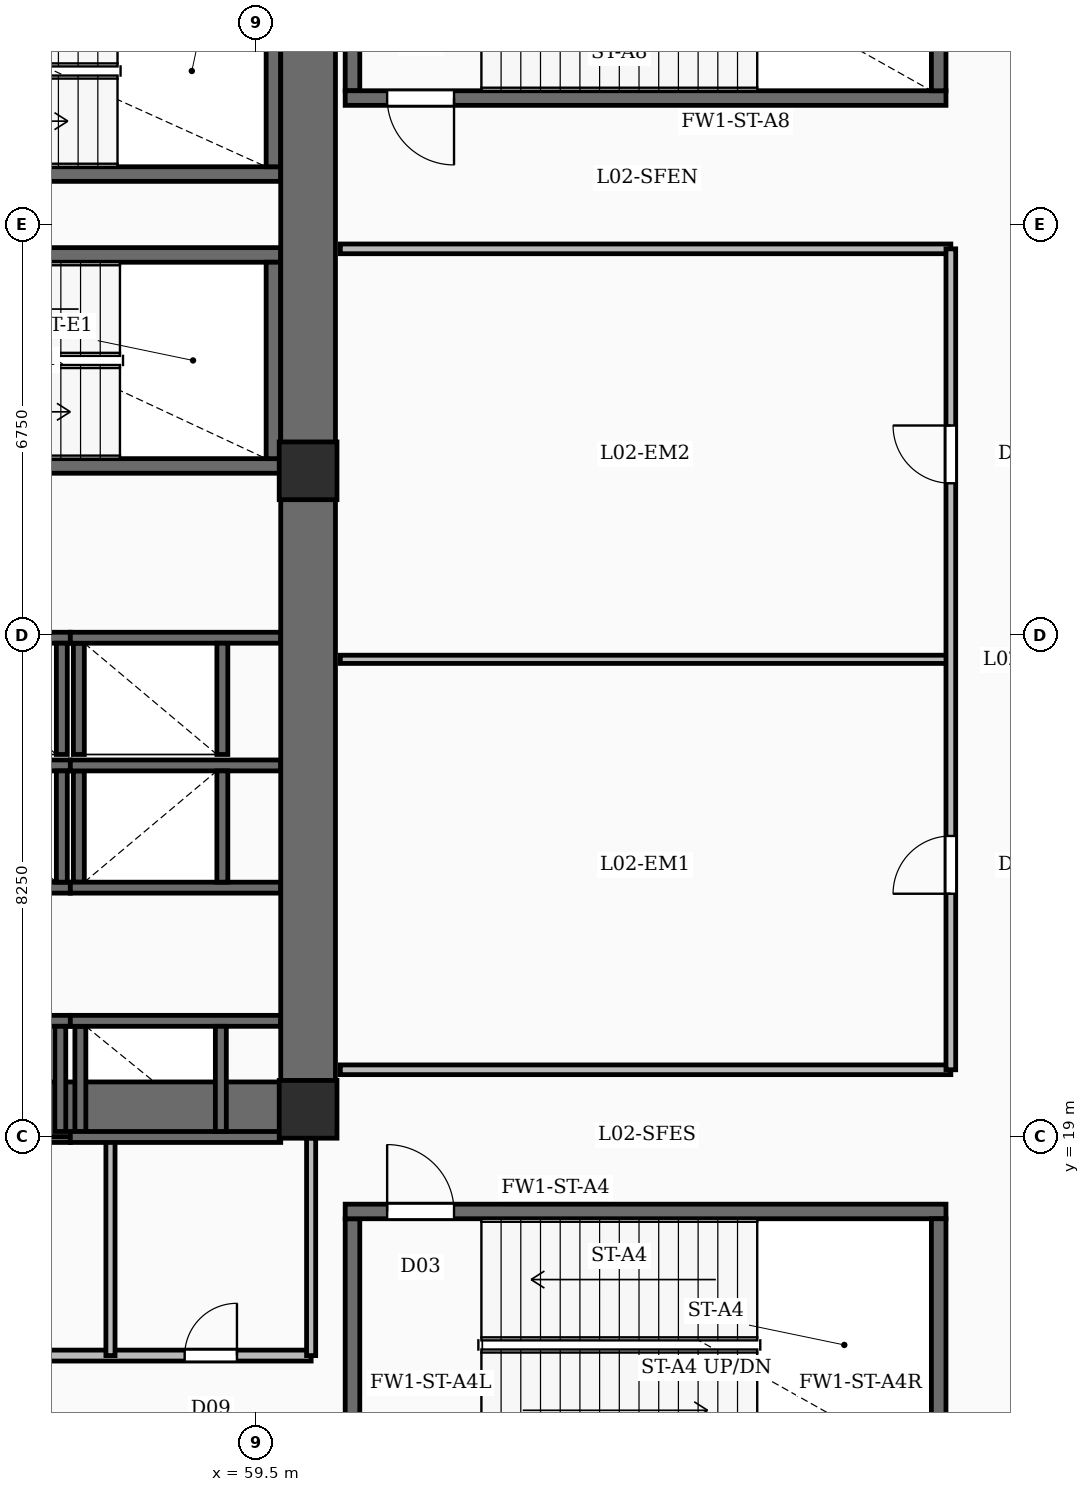
"""IFC4 building model, lengths in metres.
Left out: names, types, materials, properties, quantities, classifications, styles, units other than length and angle.
Written with IfcOpenShell. Run it as: python <this file> out.ifc"""

import sys

from ifc_helpers import new_model, si_unit, direction, frame, frame_2d, origin, origin_2d, place, context, subcontext, project, spatial, rectangle, extrude, element, fill, save


model = new_model("IFC4")
c1 = context("Model", 3, precision=1e-05, world=origin(), true_north=direction((0.0, 1.0)))
c2 = subcontext(c1, "Body", "Model", "MODEL_VIEW")
j1 = project(units=[si_unit("LENGTHUNIT", "METRE"), si_unit("PLANEANGLEUNIT", "RADIAN")], contexts=[c1])
p1 = place(None, origin())
s1 = spatial("IfcSite", under=j1, at=p1, CompositionType="ELEMENT")
p2 = place(p1, origin())
s2 = spatial("IfcBuilding", under=s1, at=p2, CompositionType="ELEMENT")
p3 = place(p2, frame((0.0, 0.0, 13.0)))
s3 = spatial("IfcBuildingStorey", under=s2, at=p3, CompositionType="ELEMENT", Elevation=13.0)
p4 = place(p3, frame((60.35, 19.0, -0.35), z_axis=(0.0, 0.0, 1.0), x_axis=(0.0, 1.0, 0.0)))
e1 = element("IfcWall", 1, at=p4, inside=s3, PredefinedType="SHEAR", context=c2, shape_type="SweptSolid", body=[
    extrude(rectangle(XDim=20.8, YDim=0.9, at=frame_2d((10.4, 0.0))), origin(), (0.0, 0.0, 1.0), 5.0),
])
p5 = place(p3, frame((51.0, 19.45, -0.35), z_axis=(0.0, 0.0, 1.0), x_axis=(1.0, 0.0, 0.0)))
e2 = element("IfcWall", 2, at=p5, inside=s3, PredefinedType="SHEAR", context=c2, shape_type="SweptSolid", body=[
    extrude(rectangle(XDim=8.9, YDim=0.9, at=frame_2d((4.45, 0.0))), origin(), (0.0, 0.0, 1.0), 5.0),
])
for number, where, z_axis, x_axis in (
    (3, (60.35, 19.45, -0.35), (0.0, 0.0, 1.0), (1.0, 0.0, 0.0)),
    (4, (60.35, 29.95, -0.35), (0.0, 0.0, 1.0), (1.0, 0.0, 0.0)),
):
    element("IfcColumn", number, at=place(p3, frame(where, z_axis=z_axis, x_axis=x_axis)), inside=s3, PredefinedType="COLUMN", context=c2, shape_type="SweptSolid", body=[
        extrude(rectangle(XDim=0.95, YDim=0.95, at=origin_2d()), origin(), (0.0, 0.0, 1.0), 5.0),
    ])
p6 = place(p3, frame((60.96, 17.77, 0.0), z_axis=(0.0, 0.0, 1.0), x_axis=(1.0, 0.0, 0.0)))
e5 = element("IfcWall", 5, at=p6, inside=s3, PredefinedType="SOLIDWALL", context=c2, shape_type="SweptSolid", body=[
    extrude(rectangle(XDim=9.88, YDim=0.24, at=frame_2d((4.94, 0.0))), origin(), (0.0, 0.0, 1.0), 4.65),
])
p7 = place(p6, frame((0.69, 0.0, 0.0)))
e6 = element("IfcOpeningElement", 6, at=p7, cuts=e5, PredefinedType="OPENING", context=c2, shape_type="SweptSolid", body=[
    extrude(rectangle(XDim=1.1, YDim=2.15, at=frame_2d((0.55, 1.075))), frame((0.0, 0.13, 0.0), z_axis=(0.0, -1.0, 0.0), x_axis=(1.0, 0.0, 0.0)), (0.0, 0.0, 1.0), 0.26),
])
for number, where, z_axis, x_axis in (
    (7, (61.08, 13.5, 0.0), (0.0, 0.0, 1.0), (0.0, 1.0, 0.0)),
    (8, (70.72, 13.5, 0.0), (0.0, 0.0, 1.0), (0.0, 1.0, 0.0)),
):
    element("IfcWall", number, at=place(p3, frame(where, z_axis=z_axis, x_axis=x_axis)), inside=s3, PredefinedType="SOLIDWALL", context=c2, shape_type="SweptSolid", body=[
        extrude(rectangle(XDim=4.15, YDim=0.24, at=frame_2d((2.075, 0.0))), origin(), (0.0, 0.0, 1.0), 4.65),
    ])
p8 = place(p3, frame((70.84, 36.08, 0.0), z_axis=(0.0, 0.0, 1.0), x_axis=(-1.0, 0.0, 0.0)))
e9 = element("IfcWall", 9, at=p8, inside=s3, PredefinedType="SOLIDWALL", context=c2, shape_type="SweptSolid", body=[
    extrude(rectangle(XDim=9.88, YDim=0.24, at=frame_2d((4.94, 0.0))), origin(), (0.0, 0.0, 1.0), 4.65),
])
p9 = place(p8, frame((8.09, 0.0, 0.0)))
e10 = element("IfcOpeningElement", 10, at=p9, cuts=e9, PredefinedType="OPENING", context=c2, shape_type="SweptSolid", body=[
    extrude(rectangle(XDim=1.1, YDim=2.15, at=frame_2d((0.55, 1.075))), frame((0.0, 0.13, 0.0), z_axis=(0.0, -1.0, 0.0), x_axis=(1.0, 0.0, 0.0)), (0.0, 0.0, 1.0), 0.26),
])
for number, where, z_axis, x_axis in (
    (11, (61.08, 36.2, 0.0), (0.0, 0.0, 1.0), (0.0, 1.0, 0.0)),
    (12, (70.72, 36.2, 0.0), (0.0, 0.0, 1.0), (0.0, 1.0, 0.0)),
):
    element("IfcWall", number, at=place(p3, frame(where, z_axis=z_axis, x_axis=x_axis)), inside=s3, PredefinedType="SOLIDWALL", context=c2, shape_type="SweptSolid", body=[
        extrude(rectangle(XDim=4.15, YDim=0.24, at=frame_2d((2.075, 0.0))), origin(), (0.0, 0.0, 1.0), 4.65),
    ])
p10 = place(p3, frame((59.9, 30.03, 0.0), z_axis=(0.0, 0.0, 1.0), x_axis=(-1.0, 0.0, 0.0)))
e13 = element("IfcWall", 13, at=p10, inside=s3, PredefinedType="SOLIDWALL", context=c2, shape_type="SweptSolid", body=[
    extrude(rectangle(XDim=8.9, YDim=0.24, at=frame_2d((4.45, 0.0))), origin(), (0.0, 0.0, 1.0), 4.65),
])
p11 = place(p10, frame((7.38, 0.0, 0.0)))
e14 = element("IfcOpeningElement", 14, at=p11, cuts=e13, PredefinedType="OPENING", context=c2, shape_type="SweptSolid", body=[
    extrude(rectangle(XDim=1.1, YDim=2.15, at=frame_2d((0.55, 1.075))), frame((0.0, 0.13, 0.0), z_axis=(0.0, -1.0, 0.0), x_axis=(1.0, 0.0, 0.0)), (0.0, 0.0, 1.0), 0.26),
])
p12 = place(p3, frame((51.0, 33.5, 0.0), z_axis=(0.0, 0.0, 1.0), x_axis=(1.0, 0.0, 0.0)))
e15 = element("IfcWall", 15, at=p12, inside=s3, PredefinedType="SOLIDWALL", context=c2, shape_type="SweptSolid", body=[
    extrude(rectangle(XDim=8.9, YDim=0.24, at=frame_2d((4.45, 0.0))), origin(), (0.0, 0.0, 1.0), 4.65),
])
p13 = place(p3, frame((59.78, 30.15, 0.0), z_axis=(0.0, 0.0, 1.0), x_axis=(0.0, 1.0, 0.0)))
e16 = element("IfcWall", 16, at=p13, inside=s3, PredefinedType="SOLIDWALL", context=c2, shape_type="SweptSolid", body=[
    extrude(rectangle(XDim=3.23, YDim=0.24, at=frame_2d((1.615, 0.0))), origin(), (0.0, 0.0, 1.0), 4.65),
])
p14 = place(p3, frame((59.9, 34.83, 0.0), z_axis=(0.0, 0.0, 1.0), x_axis=(-1.0, 0.0, 0.0)))
e17 = element("IfcWall", 17, at=p14, inside=s3, PredefinedType="SOLIDWALL", context=c2, shape_type="SweptSolid", body=[
    extrude(rectangle(XDim=8.9, YDim=0.24, at=frame_2d((4.45, 0.0))), origin(), (0.0, 0.0, 1.0), 4.65),
])
p15 = place(p14, frame((7.42, 0.0, 0.0)))
e18 = element("IfcOpeningElement", 18, at=p15, cuts=e17, PredefinedType="OPENING", context=c2, shape_type="SweptSolid", body=[
    extrude(rectangle(XDim=1.1, YDim=2.15, at=frame_2d((0.55, 1.075))), frame((0.0, 0.13, 0.0), z_axis=(0.0, -1.0, 0.0), x_axis=(1.0, 0.0, 0.0)), (0.0, 0.0, 1.0), 0.26),
])
p16 = place(p3, frame((59.78, 34.95, 0.0), z_axis=(0.0, 0.0, 1.0), x_axis=(0.0, 1.0, 0.0)))
e19 = element("IfcWall", 19, at=p16, inside=s3, PredefinedType="SOLIDWALL", context=c2, shape_type="SweptSolid", body=[
    extrude(rectangle(XDim=3.15, YDim=0.24, at=frame_2d((1.575, 0.0))), origin(), (0.0, 0.0, 1.0), 4.65),
])
for number, where, z_axis, x_axis in (
    (20, (53.79, 20.905, 0.0), (0.0, 0.0, 1.0), (1.0, 0.0, 0.0)),
    (21, (53.79, 18.995, 0.0), (0.0, 0.0, 1.0), (1.0, 0.0, 0.0)),
):
    element("IfcWall", number, at=place(p3, frame(where, z_axis=z_axis, x_axis=x_axis)), inside=s3, PredefinedType="SOLIDWALL", context=c2, shape_type="SweptSolid", body=[
        extrude(rectangle(XDim=2.65, YDim=0.18, at=frame_2d((1.325, 0.0))), origin(), (0.0, 0.0, 1.0), 4.65),
    ])
p17 = place(p3, frame((56.275, 19.085, 0.0), z_axis=(0.0, 0.0, 1.0), x_axis=(0.0, 1.0, 0.0)))
e22 = element("IfcWall", 22, at=p17, inside=s3, PredefinedType="SOLIDWALL", context=c2, shape_type="SweptSolid", body=[
    extrude(rectangle(XDim=1.73, YDim=0.18, at=frame_2d((0.865, 0.0))), origin(), (0.0, 0.0, 1.0), 4.65),
])
for number, where, z_axis, x_axis in (
    (23, (56.44, 20.905, 0.0), (0.0, 0.0, 1.0), (1.0, 0.0, 0.0)),
    (24, (56.44, 18.995, 0.0), (0.0, 0.0, 1.0), (1.0, 0.0, 0.0)),
):
    element("IfcWall", number, at=place(p3, frame(where, z_axis=z_axis, x_axis=x_axis)), inside=s3, PredefinedType="SOLIDWALL", context=c2, shape_type="SweptSolid", body=[
        extrude(rectangle(XDim=3.46, YDim=0.18, at=frame_2d((1.73, 0.0))), origin(), (0.0, 0.0, 1.0), 4.65),
    ])
for number, where, z_axis, x_axis in (
    (25, (56.605, 19.085, 0.0), (0.0, 0.0, 1.0), (0.0, 1.0, 0.0)),
    (26, (58.915, 19.085, 0.0), (0.0, 0.0, 1.0), (0.0, 1.0, 0.0)),
):
    element("IfcWall", number, at=place(p3, frame(where, z_axis=z_axis, x_axis=x_axis)), inside=s3, PredefinedType="SOLIDWALL", context=c2, shape_type="SweptSolid", body=[
        extrude(rectangle(XDim=1.73, YDim=0.18, at=frame_2d((0.865, 0.0))), origin(), (0.0, 0.0, 1.0), 4.65),
    ])
for number, where, z_axis, x_axis in (
    (27, (53.778, 25.105, 0.0), (0.0, 0.0, 1.0), (1.0, 0.0, 0.0)),
    (28, (53.778, 23.095, 0.0), (0.0, 0.0, 1.0), (1.0, 0.0, 0.0)),
):
    element("IfcWall", number, at=place(p3, frame(where, z_axis=z_axis, x_axis=x_axis)), inside=s3, PredefinedType="SOLIDWALL", context=c2, shape_type="SweptSolid", body=[
        extrude(rectangle(XDim=2.662, YDim=0.18, at=frame_2d((1.331, 0.0))), origin(), (0.0, 0.0, 1.0), 4.65),
    ])
p18 = place(p3, frame((56.3, 23.185, 0.0), z_axis=(0.0, 0.0, 1.0), x_axis=(0.0, 1.0, 0.0)))
e29 = element("IfcWall", 29, at=p18, inside=s3, PredefinedType="SOLIDWALL", context=c2, shape_type="SweptSolid", body=[
    extrude(rectangle(XDim=1.83, YDim=0.18, at=frame_2d((0.915, 0.0))), origin(), (0.0, 0.0, 1.0), 4.65),
])
for number, where, z_axis, x_axis in (
    (30, (56.44, 25.105, 0.0), (0.0, 0.0, 1.0), (1.0, 0.0, 0.0)),
    (31, (56.44, 23.095, 0.0), (0.0, 0.0, 1.0), (1.0, 0.0, 0.0)),
):
    element("IfcWall", number, at=place(p3, frame(where, z_axis=z_axis, x_axis=x_axis)), inside=s3, PredefinedType="SOLIDWALL", context=c2, shape_type="SweptSolid", body=[
        extrude(rectangle(XDim=3.46, YDim=0.18, at=frame_2d((1.73, 0.0))), origin(), (0.0, 0.0, 1.0), 4.65),
    ])
for number, where, z_axis, x_axis in (
    (32, (56.58, 23.185, 0.0), (0.0, 0.0, 1.0), (0.0, 1.0, 0.0)),
    (33, (58.94, 23.185, 0.0), (0.0, 0.0, 1.0), (0.0, 1.0, 0.0)),
):
    element("IfcWall", number, at=place(p3, frame(where, z_axis=z_axis, x_axis=x_axis)), inside=s3, PredefinedType="SOLIDWALL", context=c2, shape_type="SweptSolid", body=[
        extrude(rectangle(XDim=1.83, YDim=0.18, at=frame_2d((0.915, 0.0))), origin(), (0.0, 0.0, 1.0), 4.65),
    ])
p19 = place(p3, frame((53.865, 27.205, 0.0), z_axis=(0.0, 0.0, 1.0), x_axis=(1.0, 0.0, 0.0)))
e34 = element("IfcWall", 34, at=p19, inside=s3, PredefinedType="SOLIDWALL", context=c2, shape_type="SweptSolid", body=[
    extrude(rectangle(XDim=2.575, YDim=0.18, at=frame_2d((1.288, 0.0))), origin(), (0.0, 0.0, 1.0), 4.65),
])
p20 = place(p3, frame((56.3, 25.285, 0.0), z_axis=(0.0, 0.0, 1.0), x_axis=(0.0, 1.0, 0.0)))
e35 = element("IfcWall", 35, at=p20, inside=s3, PredefinedType="SOLIDWALL", context=c2, shape_type="SweptSolid", body=[
    extrude(rectangle(XDim=1.83, YDim=0.18, at=frame_2d((0.915, 0.0))), origin(), (0.0, 0.0, 1.0), 4.65),
])
p21 = place(p3, frame((56.44, 27.205, 0.0), z_axis=(0.0, 0.0, 1.0), x_axis=(1.0, 0.0, 0.0)))
e36 = element("IfcWall", 36, at=p21, inside=s3, PredefinedType="SOLIDWALL", context=c2, shape_type="SweptSolid", body=[
    extrude(rectangle(XDim=3.46, YDim=0.18, at=frame_2d((1.73, 0.0))), origin(), (0.0, 0.0, 1.0), 4.65),
])
for number, where, z_axis, x_axis in (
    (37, (56.58, 25.285, 0.0), (0.0, 0.0, 1.0), (0.0, 1.0, 0.0)),
    (38, (58.94, 25.285, 0.0), (0.0, 0.0, 1.0), (0.0, 1.0, 0.0)),
):
    element("IfcWall", number, at=place(p3, frame(where, z_axis=z_axis, x_axis=x_axis)), inside=s3, PredefinedType="SOLIDWALL", context=c2, shape_type="SweptSolid", body=[
        extrude(rectangle(XDim=1.83, YDim=0.18, at=frame_2d((0.915, 0.0))), origin(), (0.0, 0.0, 1.0), 4.65),
    ])
p22 = place(p3, frame((57.1, 15.4, 0.0), z_axis=(0.0, 0.0, 1.0), x_axis=(0.0, 1.0, 0.0)))
e39 = element("IfcWall", 39, at=p22, inside=s3, PredefinedType="PARTITIONING", context=c2, shape_type="SweptSolid", body=[
    extrude(rectangle(XDim=3.58, YDim=0.15, at=frame_2d((1.79, 0.0))), origin(), (0.0, 0.0, 1.0), 3.71),
])
p23 = place(p3, frame((50.4, 15.4, 0.0), z_axis=(0.0, 0.0, 1.0), x_axis=(1.0, 0.0, 0.0)))
e40 = element("IfcWall", 40, at=p23, inside=s3, PredefinedType="SOLIDWALL", context=c2, shape_type="SweptSolid", body=[
    extrude(rectangle(XDim=10.0, YDim=0.18, at=frame_2d((5.0, 0.0))), origin(), (0.0, 0.0, 1.0), 3.71),
])
p24 = place(p23, frame((1.19, 0.0, 0.0)))
e41 = element("IfcOpeningElement", 41, at=p24, cuts=e40, PredefinedType="OPENING", context=c2, shape_type="SweptSolid", body=[
    extrude(rectangle(XDim=0.92, YDim=2.1, at=frame_2d((0.46, 1.05))), frame((0.0, 0.1, 0.0), z_axis=(0.0, -1.0, 0.0), x_axis=(1.0, 0.0, 0.0)), (0.0, 0.0, 1.0), 0.2),
])
p25 = place(p23, frame((4.54, 0.0, 0.0)))
e42 = element("IfcOpeningElement", 42, at=p25, cuts=e40, PredefinedType="OPENING", context=c2, shape_type="SweptSolid", body=[
    extrude(rectangle(XDim=0.92, YDim=2.1, at=frame_2d((0.46, 1.05))), frame((0.0, 0.1, 0.0), z_axis=(0.0, -1.0, 0.0), x_axis=(1.0, 0.0, 0.0)), (0.0, 0.0, 1.0), 0.2),
])
p26 = place(p23, frame((7.92, 0.0, 0.0)))
e43 = element("IfcOpeningElement", 43, at=p26, cuts=e40, PredefinedType="OPENING", context=c2, shape_type="SweptSolid", body=[
    extrude(rectangle(XDim=0.86, YDim=2.05, at=frame_2d((0.43, 1.025))), frame((0.0, 0.1, 0.0), z_axis=(0.0, -1.0, 0.0), x_axis=(1.0, 0.0, 0.0)), (0.0, 0.0, 1.0), 0.2),
])
p27 = place(p3, frame((60.4, 15.4, 0.0), z_axis=(0.0, 0.0, 1.0), x_axis=(0.0, 1.0, 0.0)))
e44 = element("IfcWall", 44, at=p27, inside=s3, PredefinedType="PARTITIONING", context=c2, shape_type="SweptSolid", body=[
    extrude(rectangle(XDim=3.58, YDim=0.15, at=frame_2d((1.79, 0.0))), origin(), (0.0, 0.0, 1.0), 3.71),
])
p28 = place(p3, frame((60.88, 26.85, 0.0), z_axis=(0.0, 0.0, 1.0), x_axis=(1.0, 0.0, 0.0)))
e45 = element("IfcWall", 45, at=p28, inside=s3, PredefinedType="PARTITIONING", context=c2, shape_type="SweptSolid", body=[
    extrude(rectangle(XDim=10.04, YDim=0.135, at=frame_2d((5.02, 0.0))), origin(), (0.0, 0.0, 1.0), 3.71),
])
p29 = place(p3, frame((70.92, 20.1, 0.0), z_axis=(0.0, 0.0, 1.0), x_axis=(0.0, 1.0, 0.0)))
e46 = element("IfcWall", 46, at=p29, inside=s3, PredefinedType="PARTITIONING", context=c2, shape_type="SweptSolid", body=[
    extrude(rectangle(XDim=13.5, YDim=0.16, at=frame_2d((6.75, 0.0))), origin(), (0.0, 0.0, 1.0), 3.71),
])
p30 = place(p29, frame((2.895, 0.0, 0.0)))
e47 = element("IfcOpeningElement", 47, at=p30, cuts=e46, PredefinedType="OPENING", context=c2, shape_type="SweptSolid", body=[
    extrude(rectangle(XDim=0.95, YDim=2.15, at=frame_2d((0.475, 1.075))), frame((0.0, 0.09, 0.0), z_axis=(0.0, -1.0, 0.0), x_axis=(1.0, 0.0, 0.0)), (0.0, 0.0, 1.0), 0.18),
])
p31 = place(p29, frame((9.645, 0.0, 0.0)))
e48 = element("IfcOpeningElement", 48, at=p31, cuts=e46, PredefinedType="OPENING", context=c2, shape_type="SweptSolid", body=[
    extrude(rectangle(XDim=0.95, YDim=2.15, at=frame_2d((0.475, 1.075))), frame((0.0, 0.09, 0.0), z_axis=(0.0, -1.0, 0.0), x_axis=(1.0, 0.0, 0.0)), (0.0, 0.0, 1.0), 0.18),
])
for number, where, z_axis, x_axis in (
    (49, (60.88, 20.1, 0.0), (0.0, 0.0, 1.0), (1.0, 0.0, 0.0)),
    (50, (60.88, 33.6, 0.0), (0.0, 0.0, 1.0), (1.0, 0.0, 0.0)),
):
    element("IfcWall", number, at=place(p3, frame(where, z_axis=z_axis, x_axis=x_axis)), inside=s3, PredefinedType="PARTITIONING", context=c2, shape_type="SweptSolid", body=[
        extrude(rectangle(XDim=10.04, YDim=0.16, at=frame_2d((5.02, 0.0))), origin(), (0.0, 0.0, 1.0), 3.71),
    ])
p32 = place(p7, origin())
e51 = element("IfcDoor", 51, at=p32, inside=s3, OperationType="SINGLE_SWING_LEFT", PredefinedType="DOOR", context=c2, shape_type="SweptSolid", body=[
    extrude(rectangle(XDim=1.1, YDim=2.15, at=frame_2d((0.55, 1.075))), frame((0.0, 0.025, 0.0), z_axis=(0.0, -1.0, 0.0), x_axis=(1.0, 0.0, 0.0)), (0.0, 0.0, 1.0), 0.05),
])
fill(e6, e51)
p33 = place(p9, origin())
e52 = element("IfcDoor", 52, at=p33, inside=s3, OperationType="SINGLE_SWING_LEFT", PredefinedType="DOOR", context=c2, shape_type="SweptSolid", body=[
    extrude(rectangle(XDim=1.1, YDim=2.15, at=frame_2d((0.55, 1.075))), frame((0.0, 0.025, 0.0), z_axis=(0.0, -1.0, 0.0), x_axis=(1.0, 0.0, 0.0)), (0.0, 0.0, 1.0), 0.05),
])
fill(e10, e52)
p34 = place(p26, origin())
e53 = element("IfcDoor", 53, at=p34, inside=s3, OperationType="SINGLE_SWING_RIGHT", PredefinedType="DOOR", context=c2, shape_type="SweptSolid", body=[
    extrude(rectangle(XDim=0.86, YDim=2.05, at=frame_2d((0.43, 1.025))), frame((0.0, 0.025, 0.0), z_axis=(0.0, -1.0, 0.0), x_axis=(1.0, 0.0, 0.0)), (0.0, 0.0, 1.0), 0.05),
])
fill(e43, e53)
p35 = place(p30, origin())
e54 = element("IfcDoor", 54, at=p35, inside=s3, OperationType="SINGLE_SWING_LEFT", PredefinedType="DOOR", context=c2, shape_type="SweptSolid", body=[
    extrude(rectangle(XDim=0.95, YDim=2.15, at=frame_2d((0.475, 1.075))), frame((0.0, 0.025, 0.0), z_axis=(0.0, -1.0, 0.0), x_axis=(1.0, 0.0, 0.0)), (0.0, 0.0, 1.0), 0.05),
])
fill(e47, e54)
p36 = place(p31, origin())
e55 = element("IfcDoor", 55, at=p36, inside=s3, OperationType="SINGLE_SWING_RIGHT", PredefinedType="DOOR", context=c2, shape_type="SweptSolid", body=[
    extrude(rectangle(XDim=0.95, YDim=2.15, at=frame_2d((0.475, 1.075))), frame((0.0, 0.025, 0.0), z_axis=(0.0, -1.0, 0.0), x_axis=(1.0, 0.0, 0.0)), (0.0, 0.0, 1.0), 0.05),
])
fill(e48, e55)
save(model, sys.argv[1])
